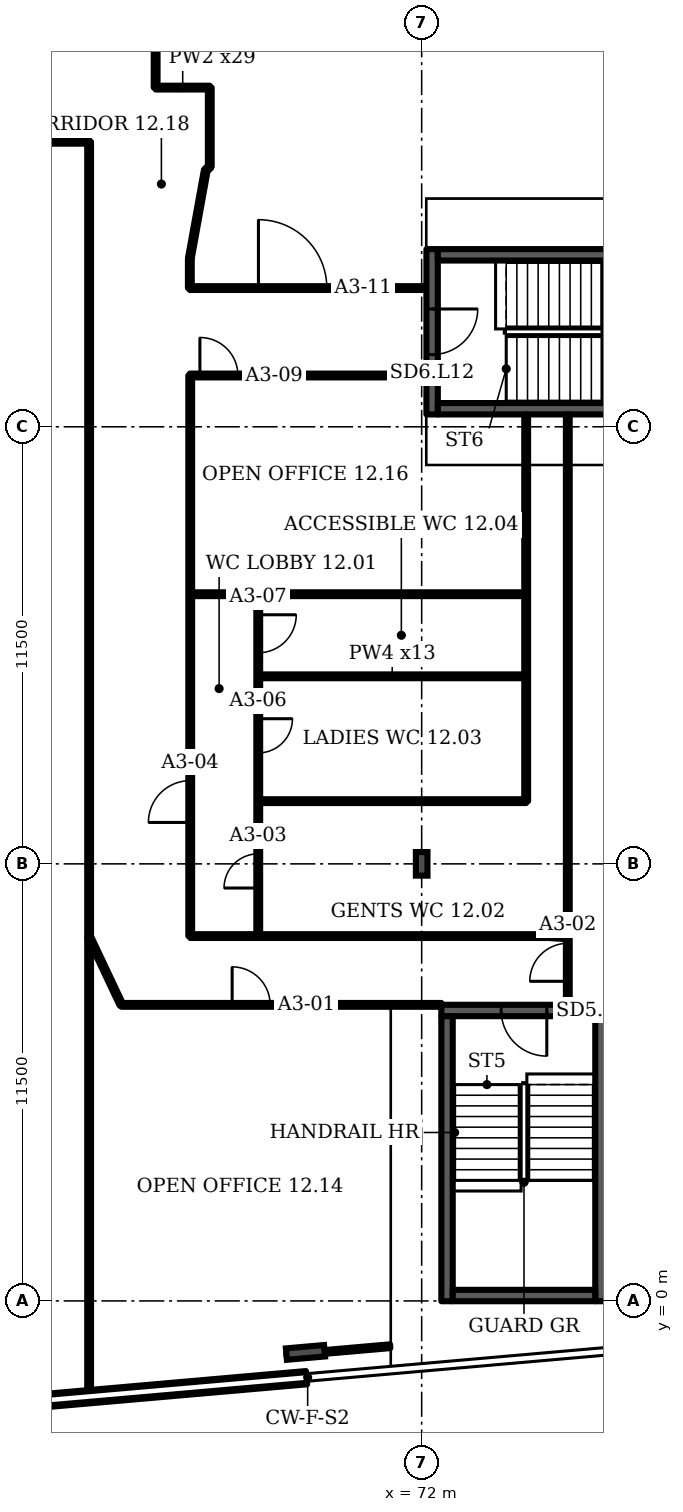
"""IFC4 building model, lengths in metres.
Left out: names, types, materials, properties, quantities, classifications, styles, units other than length and angle.
Written with IfcOpenShell. Run it as: python <this file> out.ifc"""

import sys

from ifc_helpers import new_model, si_unit, direction, frame, frame_2d, origin, origin_2d, place, context, subcontext, project, spatial, rectangle, i_section, extrude, element, fill, save


model = new_model("IFC4")
c1 = context("Model", 3, precision=1e-05, world=origin(), true_north=direction((0.0, 1.0)))
c2 = subcontext(c1, "Body", "Model", "MODEL_VIEW")
j1 = project(units=[si_unit("LENGTHUNIT", "METRE"), si_unit("PLANEANGLEUNIT", "RADIAN")], contexts=[c1])
p1 = place(None, origin())
s1 = spatial("IfcSite", under=j1, at=p1, CompositionType="ELEMENT")
p2 = place(p1, origin())
s2 = spatial("IfcBuilding", under=s1, at=p2, CompositionType="ELEMENT")
p3 = place(p2, frame((0.0, 0.0, 63.1)))
s3 = spatial("IfcBuildingStorey", under=s2, at=p3, CompositionType="ELEMENT", Elevation=63.1)
p4 = place(p3, frame((68.942, -1.355, 0.0), z_axis=(0.0, 0.0, 1.0), x_axis=(0.087156, -0.996198, 0.0)))
e1 = element("IfcColumn", 1, at=p4, inside=s3, PredefinedType="COLUMN", context=c2, shape_type="SweptSolid", body=[
    extrude(i_section(OverallWidth=0.302, OverallDepth=1.008, WebThickness=0.021, FlangeThickness=0.04, FilletRadius=0.03, at=origin_2d()), origin(), (0.0, 0.0, 1.0), 3.6),
])
p5 = place(p3, frame((72.0, 11.5, 0.0), z_axis=(0.0, 0.0, 1.0), x_axis=(1.0, 0.0, 0.0)))
e2 = element("IfcColumn", 2, at=p5, inside=s3, PredefinedType="COLUMN", context=c2, shape_type="SweptSolid", body=[
    extrude(i_section(OverallWidth=0.305, OverallDepth=0.62, WebThickness=0.021, FlangeThickness=0.04, FilletRadius=0.027, at=origin_2d()), origin(), (0.0, 0.0, 1.0), 3.6),
])
p6 = place(p3, frame((46.045, -4.026, 0.0), z_axis=(0.0, 0.0, 1.0), x_axis=(0.99619, 0.087163, 0.0)))
e3 = element("IfcWall", 3, at=p6, inside=s3, PredefinedType="SOLIDWALL", context=c2, shape_type="SweptSolid", body=[
    extrude(rectangle(XDim=23.013, YDim=0.35, at=frame_2d((11.506, 0.0))), origin(), (0.0, 0.0, 1.0), 1.0),
])
p7 = place(p3, frame((72.518, 7.642, 0.0), z_axis=(0.0, 0.0, 1.0), x_axis=(1.0, 0.0, 0.0)))
e4 = element("IfcWall", 4, at=p7, inside=s3, PredefinedType="SHEAR", context=c2, shape_type="SweptSolid", body=[
    extrude(rectangle(XDim=4.35, YDim=0.3, at=frame_2d((2.175, 0.0))), origin(), (0.0, 0.0, 1.0), 3.2),
])
p8 = place(p7, frame((1.575, 0.0, 0.0)))
e5 = element("IfcOpeningElement", 5, at=p8, cuts=e4, PredefinedType="OPENING", context=c2, shape_type="SweptSolid", body=[
    extrude(rectangle(XDim=1.2, YDim=2.1, at=frame_2d((0.6, 1.05))), frame((0.0, 0.16, 0.0), z_axis=(0.0, -1.0, 0.0), x_axis=(1.0, 0.0, 0.0)), (0.0, 0.0, 1.0), 0.32),
])
p9 = place(p3, frame((72.275, 23.325, 0.0), z_axis=(0.0, 0.0, 1.0), x_axis=(0.0, 1.0, 0.0)))
e6 = element("IfcWall", 6, at=p9, inside=s3, PredefinedType="SHEAR", context=c2, shape_type="SweptSolid", body=[
    extrude(rectangle(XDim=4.35, YDim=0.3, at=frame_2d((2.175, 0.0))), origin(), (0.0, 0.0, 1.0), 3.2),
])
p10 = place(p9, frame((1.575, 0.0, 0.0)))
e7 = element("IfcOpeningElement", 7, at=p10, cuts=e6, PredefinedType="OPENING", context=c2, shape_type="SweptSolid", body=[
    extrude(rectangle(XDim=1.2, YDim=2.1, at=frame_2d((0.6, 1.05))), frame((0.0, 0.16, 0.0), z_axis=(0.0, -1.0, 0.0), x_axis=(1.0, 0.0, 0.0)), (0.0, 0.0, 1.0), 0.32),
])
p11 = place(p3, frame((63.25, -2.495, 0.0), z_axis=(0.0, 0.0, 1.0), x_axis=(0.0, 1.0, 0.0)))
e8 = element("IfcWall", 8, at=p11, inside=s3, PredefinedType="PARTITIONING", context=c2, shape_type="SweptSolid", body=[
    extrude(rectangle(XDim=32.995, YDim=0.1, at=frame_2d((16.498, 0.0))), origin(), (0.0, 0.0, 1.0), 2.58),
])
p12 = place(p3, frame((64.1, 7.79, 0.0), z_axis=(0.0, 0.0, 1.0), x_axis=(1.0, 0.0, 0.0)))
e9 = element("IfcWall", 9, at=p12, inside=s3, PredefinedType="PARTITIONING", context=c2, shape_type="SweptSolid", body=[
    extrude(rectangle(XDim=8.417, YDim=0.1, at=frame_2d((4.209, 0.0))), origin(), (0.0, 0.0, 1.0), 3.2),
])
p13 = place(p12, frame((2.913, 0.0, 0.0)))
e10 = element("IfcOpeningElement", 10, at=p13, cuts=e9, PredefinedType="OPENING", context=c2, shape_type="SweptSolid", body=[
    extrude(rectangle(XDim=1.0, YDim=2.1, at=frame_2d((0.5, 1.05))), frame((0.0, 0.06, 0.0), z_axis=(0.0, -1.0, 0.0), x_axis=(1.0, 0.0, 0.0)), (0.0, 0.0, 1.0), 0.12),
])
p14 = place(p3, frame((64.1, 7.79, 0.0), z_axis=(0.0, 0.0, 1.0), x_axis=(-0.428035, 0.903766, 0.0)))
e11 = element("IfcWall", 11, at=p14, inside=s3, PredefinedType="PARTITIONING", context=c2, shape_type="SweptSolid", body=[
    extrude(rectangle(XDim=1.986, YDim=0.1, at=frame_2d((0.993, 0.0))), origin(), (0.0, 0.0, 1.0), 3.2),
])
p15 = place(p3, frame((65.0, 31.925, 0.0), z_axis=(0.0, 0.0, 1.0), x_axis=(0.0, 1.0, 0.0)))
e12 = element("IfcWall", 12, at=p15, inside=s3, PredefinedType="PARTITIONING", context=c2, shape_type="SweptSolid", body=[
    extrude(rectangle(XDim=2.055, YDim=0.1, at=frame_2d((1.027, 0.0))), origin(), (0.0, 0.0, 1.0), 3.2),
])
p16 = place(p3, frame((65.0, 31.925, 0.0), z_axis=(0.0, 0.0, 1.0), x_axis=(1.0, 0.0, 0.0)))
e13 = element("IfcWall", 13, at=p16, inside=s3, PredefinedType="PARTITIONING", context=c2, shape_type="SweptSolid", body=[
    extrude(rectangle(XDim=1.425, YDim=0.1, at=frame_2d((0.712, 0.0))), origin(), (0.0, 0.0, 1.0), 3.2),
])
p17 = place(p3, frame((65.9, 24.35, 0.0), z_axis=(0.0, 0.0, 1.0), x_axis=(1.0, 0.0, 0.0)))
e14 = element("IfcWall", 14, at=p17, inside=s3, PredefinedType="PARTITIONING", context=c2, shape_type="SweptSolid", body=[
    extrude(rectangle(XDim=6.205, YDim=0.1, at=frame_2d((3.103, 0.0))), origin(), (0.0, 0.0, 1.0), 3.2),
])
p18 = place(p17, frame((0.265, 0.0, 0.0)))
e15 = element("IfcOpeningElement", 15, at=p18, cuts=e14, PredefinedType="OPENING", context=c2, shape_type="SweptSolid", body=[
    extrude(rectangle(XDim=1.0, YDim=2.1, at=frame_2d((0.5, 1.05))), frame((0.0, 0.06, 0.0), z_axis=(0.0, -1.0, 0.0), x_axis=(1.0, 0.0, 0.0)), (0.0, 0.0, 1.0), 0.12),
])
p19 = place(p3, frame((65.9, 26.65, 0.0), z_axis=(0.0, 0.0, 1.0), x_axis=(0.0, 1.0, 0.0)))
e16 = element("IfcWall", 16, at=p19, inside=s3, PredefinedType="PARTITIONING", context=c2, shape_type="SweptSolid", body=[
    extrude(rectangle(XDim=0.785, YDim=0.1, at=frame_2d((0.393, 0.0))), origin(), (0.0, 0.0, 1.0), 3.2),
])
p20 = place(p3, frame((65.9, 26.65, 0.0), z_axis=(0.0, 0.0, 1.0), x_axis=(1.0, 0.0, 0.0)))
e17 = element("IfcWall", 17, at=p20, inside=s3, PredefinedType="PARTITIONING", context=c2, shape_type="SweptSolid", body=[
    extrude(rectangle(XDim=6.205, YDim=0.1, at=frame_2d((3.103, 0.0))), origin(), (0.0, 0.0, 1.0), 3.2),
])
p21 = place(p20, frame((1.805, 0.0, 0.0)))
e18 = element("IfcOpeningElement", 18, at=p21, cuts=e17, PredefinedType="OPENING", context=c2, shape_type="SweptSolid", body=[
    extrude(rectangle(XDim=1.8, YDim=2.1, at=frame_2d((0.9, 1.05))), frame((0.0, 0.06, 0.0), z_axis=(0.0, -1.0, 0.0), x_axis=(1.0, 0.0, 0.0)), (0.0, 0.0, 1.0), 0.12),
])
p22 = place(p3, frame((65.9, 27.435, 0.0), z_axis=(0.0, 0.0, 1.0), x_axis=(0.178584, 0.983924, 0.0)))
e19 = element("IfcWall", 19, at=p22, inside=s3, PredefinedType="PARTITIONING", context=c2, shape_type="SweptSolid", body=[
    extrude(rectangle(XDim=2.353, YDim=0.1, at=frame_2d((1.176, 0.0))), origin(), (0.0, 0.0, 1.0), 3.2),
])
p23 = place(p3, frame((65.91, 9.6, 0.0), z_axis=(0.0, 0.0, 1.0), x_axis=(0.0, 1.0, 0.0)))
e20 = element("IfcWall", 20, at=p23, inside=s3, PredefinedType="PARTITIONING", context=c2, shape_type="SweptSolid", body=[
    extrude(rectangle(XDim=14.75, YDim=0.1, at=frame_2d((7.375, 0.0))), origin(), (0.0, 0.0, 1.0), 3.2),
])
p24 = place(p23, frame((2.99, 0.0, 0.0)))
e21 = element("IfcOpeningElement", 21, at=p24, cuts=e20, PredefinedType="OPENING", context=c2, shape_type="SweptSolid", body=[
    extrude(rectangle(XDim=1.1, YDim=2.1, at=frame_2d((0.55, 1.05))), frame((0.0, 0.06, 0.0), z_axis=(0.0, -1.0, 0.0), x_axis=(1.0, 0.0, 0.0)), (0.0, 0.0, 1.0), 0.12),
])
p25 = place(p3, frame((65.91, 9.6, 0.0), z_axis=(0.0, 0.0, 1.0), x_axis=(1.0, 0.0, 0.0)))
e22 = element("IfcWall", 22, at=p25, inside=s3, PredefinedType="PARTITIONING", context=c2, shape_type="SweptSolid", body=[
    extrude(rectangle(XDim=9.485, YDim=0.1, at=frame_2d((4.743, 0.0))), origin(), (0.0, 0.0, 1.0), 3.2),
])
p26 = place(p3, frame((65.91, 18.595, 0.0), z_axis=(0.0, 0.0, 1.0), x_axis=(1.0, 0.0, 0.0)))
e23 = element("IfcWall", 23, at=p26, inside=s3, PredefinedType="PARTITIONING", context=c2, shape_type="SweptSolid", body=[
    extrude(rectangle(XDim=8.84, YDim=0.1, at=frame_2d((4.42, 0.0))), origin(), (0.0, 0.0, 1.0), 3.2),
])
p27 = place(p3, frame((66.32, 29.75, 0.0), z_axis=(0.0, 0.0, 1.0), x_axis=(0.741581, 0.670872, 0.0)))
e24 = element("IfcWall", 24, at=p27, inside=s3, PredefinedType="PARTITIONING", context=c2, shape_type="SweptSolid", body=[
    extrude(rectangle(XDim=0.142, YDim=0.1, at=frame_2d((0.071, 0.0))), origin(), (0.0, 0.0, 1.0), 3.2),
])
p28 = place(p3, frame((66.425, 29.845, 0.0), z_axis=(0.0, 0.0, 1.0), x_axis=(0.0, 1.0, 0.0)))
e25 = element("IfcWall", 25, at=p28, inside=s3, PredefinedType="PARTITIONING", context=c2, shape_type="SweptSolid", body=[
    extrude(rectangle(XDim=2.08, YDim=0.1, at=frame_2d((1.04, 0.0))), origin(), (0.0, 0.0, 1.0), 3.2),
])
p29 = place(p3, frame((67.7, 9.6, 0.0), z_axis=(0.0, 0.0, 1.0), x_axis=(0.0, 1.0, 0.0)))
e26 = element("IfcWall", 26, at=p29, inside=s3, PredefinedType="PARTITIONING", context=c2, shape_type="SweptSolid", body=[
    extrude(rectangle(XDim=8.995, YDim=0.1, at=frame_2d((4.498, 0.0))), origin(), (0.0, 0.0, 1.0), 3.2),
])
p30 = place(p29, frame((1.264, 0.0, 0.0)))
e27 = element("IfcOpeningElement", 27, at=p30, cuts=e26, PredefinedType="OPENING", context=c2, shape_type="SweptSolid", body=[
    extrude(rectangle(XDim=0.9, YDim=2.1, at=frame_2d((0.45, 1.05))), frame((0.0, 0.06, 0.0), z_axis=(0.0, -1.0, 0.0), x_axis=(1.0, 0.0, 0.0)), (0.0, 0.0, 1.0), 0.12),
])
p31 = place(p29, frame((4.819, 0.0, 0.0)))
e28 = element("IfcOpeningElement", 28, at=p31, cuts=e26, PredefinedType="OPENING", context=c2, shape_type="SweptSolid", body=[
    extrude(rectangle(XDim=0.9, YDim=2.1, at=frame_2d((0.45, 1.05))), frame((0.0, 0.06, 0.0), z_axis=(0.0, -1.0, 0.0), x_axis=(1.0, 0.0, 0.0)), (0.0, 0.0, 1.0), 0.12),
])
p32 = place(p29, frame((7.454, 0.0, 0.0)))
e29 = element("IfcOpeningElement", 29, at=p32, cuts=e26, PredefinedType="OPENING", context=c2, shape_type="SweptSolid", body=[
    extrude(rectangle(XDim=1.0, YDim=2.1, at=frame_2d((0.5, 1.05))), frame((0.0, 0.06, 0.0), z_axis=(0.0, -1.0, 0.0), x_axis=(1.0, 0.0, 0.0)), (0.0, 0.0, 1.0), 0.12),
])
for number, where, z_axis, x_axis in (
    (30, (67.7, 13.15, 0.0), (0.0, 0.0, 1.0), (1.0, 0.0, 0.0)),
    (31, (67.7, 16.435, 0.0), (0.0, 0.0, 1.0), (1.0, 0.0, 0.0)),
):
    element("IfcWall", number, at=place(p3, frame(where, z_axis=z_axis, x_axis=x_axis)), inside=s3, PredefinedType="PARTITIONING", context=c2, shape_type="SweptSolid", body=[
        extrude(rectangle(XDim=7.05, YDim=0.1, at=frame_2d((3.525, 0.0))), origin(), (0.0, 0.0, 1.0), 3.2),
    ])
p33 = place(p3, frame((68.445, -1.43, 0.0), z_axis=(0.0, 0.0, 1.0), x_axis=(0.996195, 0.087118, 0.0)))
e32 = element("IfcWall", 32, at=p33, inside=s3, PredefinedType="PARTITIONING", context=c2, shape_type="SweptSolid", body=[
    extrude(rectangle(XDim=2.738, YDim=0.1, at=frame_2d((1.369, 0.0))), origin(), (0.0, 0.0, 1.0), 2.58),
])
p34 = place(p3, frame((74.75, 13.15, 0.0), z_axis=(0.0, 0.0, 1.0), x_axis=(0.0, 1.0, 0.0)))
e33 = element("IfcWall", 33, at=p34, inside=s3, PredefinedType="PARTITIONING", context=c2, shape_type="SweptSolid", body=[
    extrude(rectangle(XDim=10.175, YDim=0.1, at=frame_2d((5.087, 0.0))), origin(), (0.0, 0.0, 1.0), 3.2),
])
p35 = place(p3, frame((75.43, 10.045, 0.0), z_axis=(0.0, 0.0, 1.0), x_axis=(1.0, 0.0, 0.0)))
e34 = element("IfcWall", 34, at=p35, inside=s3, PredefinedType="PARTITIONING", context=c2, shape_type="SweptSolid", body=[
    extrude(rectangle(XDim=0.16, YDim=0.1, at=frame_2d((0.08, 0.0))), origin(), (0.0, 0.0, 1.0), 3.2),
])
p36 = place(p3, frame((75.725, 9.575, 0.0), z_axis=(0.0, 0.0, 1.0), x_axis=(-0.99817, 0.06054, 0.0)))
e35 = element("IfcWall", 35, at=p36, inside=s3, PredefinedType="PARTITIONING", context=c2, shape_type="SweptSolid", body=[
    extrude(rectangle(XDim=0.331, YDim=0.1, at=frame_2d((0.165, 0.0))), origin(), (0.0, 0.0, 1.0), 3.2),
])
p37 = place(p3, frame((75.725, 9.575, 0.0), z_axis=(0.0, 0.0, 1.0), x_axis=(0.0, 1.0, 0.0)))
e36 = element("IfcWall", 36, at=p37, inside=s3, PredefinedType="PARTITIONING", context=c2, shape_type="SweptSolid", body=[
    extrude(rectangle(XDim=0.45, YDim=0.1, at=frame_2d((0.225, 0.0))), origin(), (0.0, 0.0, 1.0), 3.2),
])
p38 = place(p3, frame((75.845, 7.812, 0.0), z_axis=(0.0, 0.0, 1.0), x_axis=(0.0, 1.0, 0.0)))
e37 = element("IfcWall", 37, at=p38, inside=s3, PredefinedType="PARTITIONING", context=c2, shape_type="SweptSolid", body=[
    extrude(rectangle(XDim=15.513, YDim=0.1, at=frame_2d((7.756, 0.0))), origin(), (0.0, 0.0, 1.0), 3.2),
])
p39 = place(p38, frame((0.598, 0.0, 0.0)))
e38 = element("IfcOpeningElement", 38, at=p39, cuts=e37, PredefinedType="OPENING", context=c2, shape_type="SweptSolid", body=[
    extrude(rectangle(XDim=1.0, YDim=2.1, at=frame_2d((0.5, 1.05))), frame((0.0, 0.06, 0.0), z_axis=(0.0, -1.0, 0.0), x_axis=(1.0, 0.0, 0.0)), (0.0, 0.0, 1.0), 0.12),
])
p40 = place(p3, frame((44.15, 30.5, 0.0), z_axis=(0.0, 0.0, 1.0), x_axis=(1.0, 0.0, 0.0)))
e39 = element("IfcWall", 39, at=p40, inside=s3, PredefinedType="PARTITIONING", context=c2, shape_type="SweptSolid", body=[
    extrude(rectangle(XDim=19.1, YDim=0.1, at=frame_2d((9.55, 0.0))), origin(), (0.0, 0.0, 1.0), 3.2),
])
p41 = place(p40, frame((10.07, 0.0, 0.0)))
e40 = element("IfcOpeningElement", 40, at=p41, cuts=e39, PredefinedType="OPENING", context=c2, shape_type="SweptSolid", body=[
    extrude(rectangle(XDim=1.0, YDim=2.1, at=frame_2d((0.5, 1.05))), frame((0.0, 0.06, 0.0), z_axis=(0.0, -1.0, 0.0), x_axis=(1.0, 0.0, 0.0)), (0.0, 0.0, 1.0), 0.12),
])
for number, where, z_axis, x_axis in (
    (41, (72.667, -0.008, 0.0), (0.0, 0.0, 1.0), (0.0, 1.0, 0.0)),
    (42, (76.718, -0.008, 0.0), (0.0, 0.0, 1.0), (0.0, 1.0, 0.0)),
):
    element("IfcWall", number, at=place(p3, frame(where, z_axis=z_axis, x_axis=x_axis)), inside=s3, PredefinedType="SHEAR", context=c2, shape_type="SweptSolid", body=[
        extrude(rectangle(XDim=7.5, YDim=0.3, at=frame_2d((3.75, 0.0))), origin(), (0.0, 0.0, 1.0), 3.2),
    ])
p42 = place(p3, frame((72.817, 0.142, 0.0), z_axis=(0.0, 0.0, 1.0), x_axis=(1.0, 0.0, 0.0)))
e43 = element("IfcWall", 43, at=p42, inside=s3, PredefinedType="SHEAR", context=c2, shape_type="SweptSolid", body=[
    extrude(rectangle(XDim=3.75, YDim=0.3, at=frame_2d((1.875, 0.0))), origin(), (0.0, 0.0, 1.0), 3.2),
])
for number, where, z_axis, x_axis in (
    (44, (72.425, 23.475, 0.0), (0.0, 0.0, 1.0), (1.0, 0.0, 0.0)),
    (45, (72.425, 27.525, 0.0), (0.0, 0.0, 1.0), (1.0, 0.0, 0.0)),
):
    element("IfcWall", number, at=place(p3, frame(where, z_axis=z_axis, x_axis=x_axis)), inside=s3, PredefinedType="SHEAR", context=c2, shape_type="SweptSolid", body=[
        extrude(rectangle(XDim=7.5, YDim=0.3, at=frame_2d((3.75, 0.0))), origin(), (0.0, 0.0, 1.0), 3.2),
    ])
p43 = place(p8, origin())
e46 = element("IfcDoor", 46, at=p43, inside=s3, OperationType="SINGLE_SWING_RIGHT", PredefinedType="DOOR", context=c2, shape_type="SweptSolid", body=[
    extrude(rectangle(XDim=1.2, YDim=2.1, at=frame_2d((0.6, 1.05))), frame((0.0, 0.025, 0.0), z_axis=(0.0, -1.0, 0.0), x_axis=(1.0, 0.0, 0.0)), (0.0, 0.0, 1.0), 0.05),
])
fill(e5, e46)
p44 = place(p10, origin())
e47 = element("IfcDoor", 47, at=p44, inside=s3, OperationType="SINGLE_SWING_RIGHT", PredefinedType="DOOR", context=c2, shape_type="SweptSolid", body=[
    extrude(rectangle(XDim=1.2, YDim=2.1, at=frame_2d((0.6, 1.05))), frame((0.0, 0.025, 0.0), z_axis=(0.0, -1.0, 0.0), x_axis=(1.0, 0.0, 0.0)), (0.0, 0.0, 1.0), 0.05),
])
fill(e7, e47)
p45 = place(p13, origin())
e48 = element("IfcDoor", 48, at=p45, inside=s3, OperationType="SINGLE_SWING_LEFT", PredefinedType="DOOR", context=c2, shape_type="SweptSolid", body=[
    extrude(rectangle(XDim=1.0, YDim=2.1, at=frame_2d((0.5, 1.05))), frame((0.0, 0.025, 0.0), z_axis=(0.0, -1.0, 0.0), x_axis=(1.0, 0.0, 0.0)), (0.0, 0.0, 1.0), 0.05),
])
fill(e10, e48)
p46 = place(p39, origin())
e49 = element("IfcDoor", 49, at=p46, inside=s3, OperationType="SINGLE_SWING_LEFT", PredefinedType="DOOR", context=c2, shape_type="SweptSolid", body=[
    extrude(rectangle(XDim=1.0, YDim=2.1, at=frame_2d((0.5, 1.05))), frame((0.0, 0.025, 0.0), z_axis=(0.0, -1.0, 0.0), x_axis=(1.0, 0.0, 0.0)), (0.0, 0.0, 1.0), 0.05),
])
fill(e38, e49)
p47 = place(p30, origin())
e50 = element("IfcDoor", 50, at=p47, inside=s3, OperationType="SINGLE_SWING_LEFT", PredefinedType="DOOR", context=c2, shape_type="SweptSolid", body=[
    extrude(rectangle(XDim=0.9, YDim=2.1, at=frame_2d((0.45, 1.05))), frame((0.0, 0.025, 0.0), z_axis=(0.0, -1.0, 0.0), x_axis=(1.0, 0.0, 0.0)), (0.0, 0.0, 1.0), 0.05),
])
fill(e27, e50)
p48 = place(p24, origin())
e51 = element("IfcDoor", 51, at=p48, inside=s3, OperationType="SINGLE_SWING_LEFT", PredefinedType="DOOR", context=c2, shape_type="SweptSolid", body=[
    extrude(rectangle(XDim=1.1, YDim=2.1, at=frame_2d((0.55, 1.05))), frame((0.0, 0.025, 0.0), z_axis=(0.0, -1.0, 0.0), x_axis=(1.0, 0.0, 0.0)), (0.0, 0.0, 1.0), 0.05),
])
fill(e21, e51)
p49 = place(p31, origin())
e52 = element("IfcDoor", 52, at=p49, inside=s3, OperationType="SINGLE_SWING_RIGHT", PredefinedType="DOOR", context=c2, shape_type="SweptSolid", body=[
    extrude(rectangle(XDim=0.9, YDim=2.1, at=frame_2d((0.45, 1.05))), frame((0.0, 0.025, 0.0), z_axis=(0.0, -1.0, 0.0), x_axis=(1.0, 0.0, 0.0)), (0.0, 0.0, 1.0), 0.05),
])
fill(e28, e52)
p50 = place(p32, origin())
e53 = element("IfcDoor", 53, at=p50, inside=s3, OperationType="SINGLE_SWING_RIGHT", PredefinedType="DOOR", context=c2, shape_type="SweptSolid", body=[
    extrude(rectangle(XDim=1.0, YDim=2.1, at=frame_2d((0.5, 1.05))), frame((0.0, 0.025, 0.0), z_axis=(0.0, -1.0, 0.0), x_axis=(1.0, 0.0, 0.0)), (0.0, 0.0, 1.0), 0.05),
])
fill(e29, e53)
p51 = place(p18, origin())
e54 = element("IfcDoor", 54, at=p51, inside=s3, OperationType="SINGLE_SWING_LEFT", PredefinedType="DOOR", context=c2, shape_type="SweptSolid", body=[
    extrude(rectangle(XDim=1.0, YDim=2.1, at=frame_2d((0.5, 1.05))), frame((0.0, 0.025, 0.0), z_axis=(0.0, -1.0, 0.0), x_axis=(1.0, 0.0, 0.0)), (0.0, 0.0, 1.0), 0.05),
])
fill(e15, e54)
p52 = place(p21, origin())
e55 = element("IfcDoor", 55, at=p52, inside=s3, OperationType="DOUBLE_DOOR_SINGLE_SWING", PredefinedType="DOOR", context=c2, shape_type="SweptSolid", body=[
    extrude(rectangle(XDim=1.8, YDim=2.1, at=frame_2d((0.9, 1.05))), frame((0.0, 0.025, 0.0), z_axis=(0.0, -1.0, 0.0), x_axis=(1.0, 0.0, 0.0)), (0.0, 0.0, 1.0), 0.05),
])
fill(e18, e55)
save(model, sys.argv[1])
